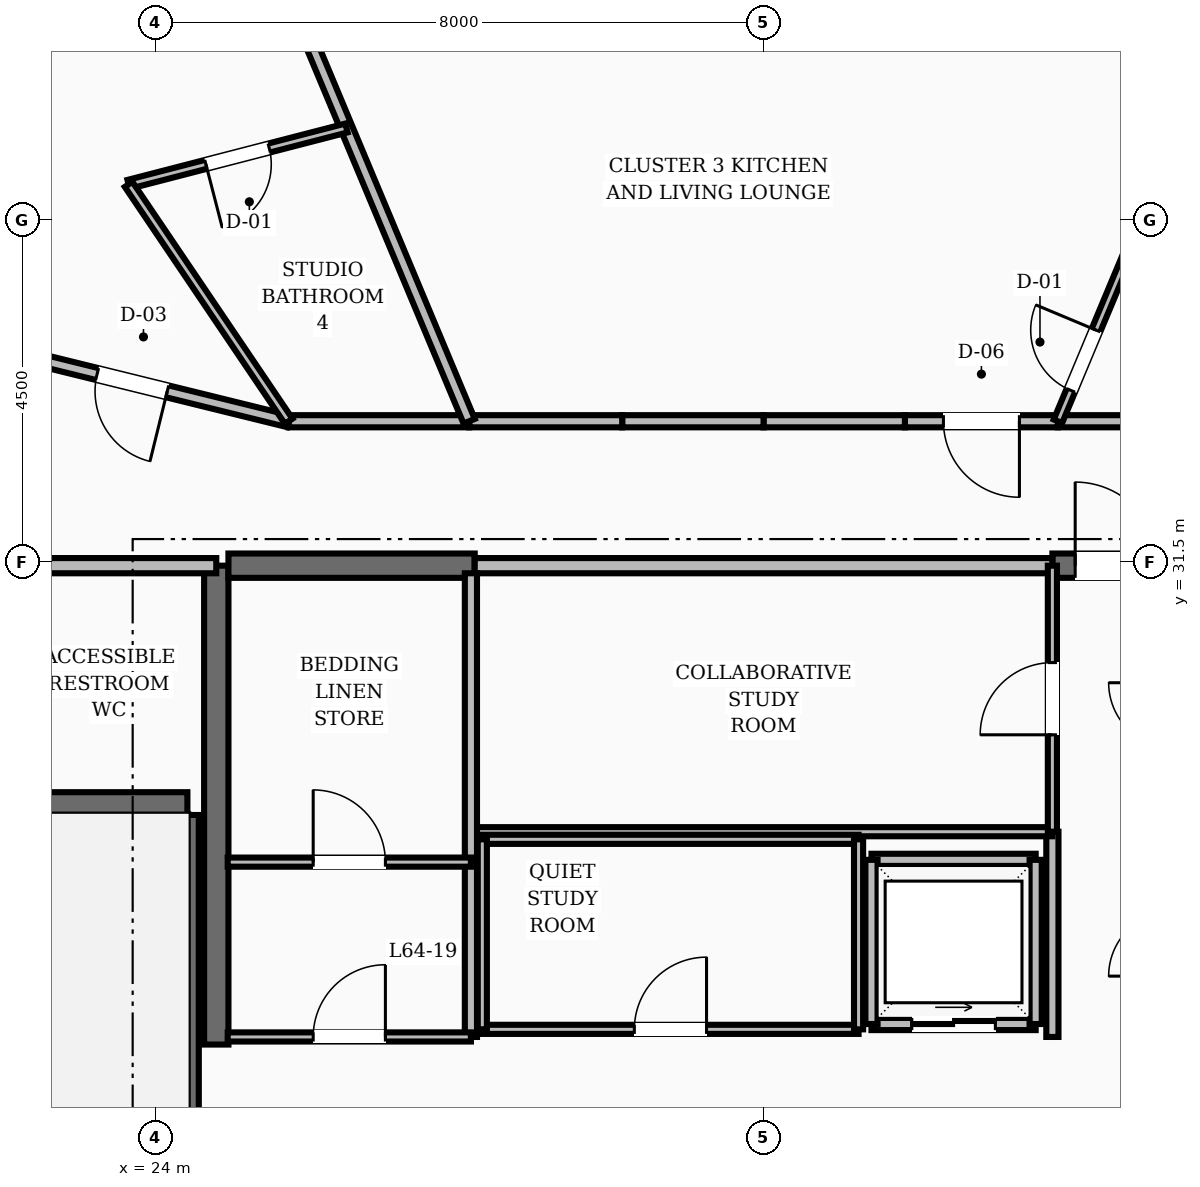
"""IFC4 building model, lengths in metres.
Left out: names, types, materials, properties, quantities, classifications, styles, units other than length and angle.
Written with IfcOpenShell. Run it as: python <this file> out.ifc"""

import sys

from ifc_helpers import new_model, si_unit, direction, frame, frame_2d, origin, place, context, subcontext, project, spatial, rectangle, extrude, element, fill, save


model = new_model("IFC4")
c1 = context("Model", 3, precision=1e-05, world=origin(), true_north=direction((0.0, 1.0)))
c2 = subcontext(c1, "Body", "Model", "MODEL_VIEW")
j1 = project(units=[si_unit("LENGTHUNIT", "METRE"), si_unit("PLANEANGLEUNIT", "RADIAN")], contexts=[c1])
p1 = place(None, origin())
s1 = spatial("IfcSite", under=j1, at=p1, CompositionType="ELEMENT")
p2 = place(p1, origin())
s2 = spatial("IfcBuilding", under=s1, at=p2, CompositionType="ELEMENT")
p3 = place(p2, frame((0.0, 0.0, 247.2)))
s3 = spatial("IfcBuildingStorey", under=s2, at=p3, CompositionType="ELEMENT", Elevation=247.2)
p4 = place(p3, frame((24.8, 25.15, 0.0), z_axis=(0.0, 0.0, 1.0), x_axis=(0.0, 1.0, 0.0)))
e1 = element("IfcWall", 1, at=p4, inside=s3, PredefinedType="SHEAR", context=c2, shape_type="SweptSolid", body=[
    extrude(rectangle(XDim=6.3, YDim=0.32, at=frame_2d((3.15, 0.0))), origin(), (0.0, 0.0, 1.0), 3.6),
])
p5 = place(p3, frame((24.96, 31.45, 0.0), z_axis=(0.0, 0.0, 1.0), x_axis=(1.0, 0.0, 0.0)))
e2 = element("IfcWall", 2, at=p5, inside=s3, PredefinedType="SHEAR", context=c2, shape_type="SweptSolid", body=[
    extrude(rectangle(XDim=3.24, YDim=0.32, at=frame_2d((1.62, 0.0))), origin(), (0.0, 0.0, 1.0), 3.6),
])
p6 = place(p3, frame((35.8, 31.45, 0.0), z_axis=(0.0, 0.0, 1.0), x_axis=(1.0, 0.0, 0.0)))
e3 = element("IfcWall", 3, at=p6, inside=s3, PredefinedType="SHEAR", context=c2, shape_type="SweptSolid", body=[
    extrude(rectangle(XDim=3.24, YDim=0.32, at=frame_2d((1.62, 0.0))), origin(), (0.0, 0.0, 1.0), 3.6),
])
p7 = place(p6, frame((0.3, 0.0, 0.0)))
e4 = element("IfcOpeningElement", 4, at=p7, cuts=e3, PredefinedType="OPENING", context=c2, shape_type="SweptSolid", body=[
    extrude(rectangle(XDim=1.1, YDim=2.1, at=frame_2d((0.55, 1.05))), frame((0.0, 0.17, 0.0), z_axis=(0.0, -1.0, 0.0), x_axis=(1.0, 0.0, 0.0)), (0.0, 0.0, 1.0), 0.34),
])
p8 = place(p3, frame((24.42, 19.43, 0.0), z_axis=(0.0, 0.0, 1.0), x_axis=(0.0, 1.0, 0.0)))
e5 = element("IfcWall", 5, at=p8, inside=s3, PredefinedType="SHEAR", context=c2, shape_type="SweptSolid", body=[
    extrude(rectangle(XDim=8.74, YDim=0.3, at=frame_2d((4.37, 0.0))), origin(), (0.0, 0.0, 1.0), 3.6),
])
p9 = place(p3, frame((20.82, 28.32, 0.0), z_axis=(0.0, 0.0, 1.0), x_axis=(1.0, 0.0, 0.0)))
e6 = element("IfcWall", 6, at=p9, inside=s3, PredefinedType="SHEAR", context=c2, shape_type="SweptSolid", body=[
    extrude(rectangle(XDim=3.6, YDim=0.3, at=frame_2d((1.8, 0.0))), origin(), (0.0, 0.0, 1.0), 3.6),
])
p10 = place(p3, frame((20.82, 31.45, 0.0), z_axis=(0.0, 0.0, 1.0), x_axis=(1.0, 0.0, 0.0)))
e7 = element("IfcWall", 7, at=p10, inside=s3, PredefinedType="SOLIDWALL", context=c2, shape_type="SweptSolid", body=[
    extrude(rectangle(XDim=3.98, YDim=0.2, at=frame_2d((1.99, 0.0))), origin(), (0.0, 0.0, 1.0), 2.87),
])
p11 = place(p3, frame((35.8, 25.25, 0.0), z_axis=(0.0, 0.0, 1.0), x_axis=(0.0, 1.0, 0.0)))
e8 = element("IfcWall", 8, at=p11, inside=s3, PredefinedType="SOLIDWALL", context=c2, shape_type="SweptSolid", body=[
    extrude(rectangle(XDim=2.7, YDim=0.16, at=frame_2d((1.35, 0.0))), origin(), (0.0, 0.0, 1.0), 2.87),
])
p12 = place(p3, frame((33.42, 25.42, 0.0), z_axis=(0.0, 0.0, 1.0), x_axis=(1.0, 0.0, 0.0)))
e9 = element("IfcWall", 9, at=p12, inside=s3, PredefinedType="SOLIDWALL", context=c2, shape_type="SweptSolid", body=[
    extrude(rectangle(XDim=2.16, YDim=0.16, at=frame_2d((1.08, 0.0))), origin(), (0.0, 0.0, 1.0), 2.87),
])
p13 = place(p12, frame((0.53, 0.0, 0.0)))
e10 = element("IfcOpeningElement", 10, at=p13, cuts=e9, PredefinedType="OPENING", context=c2, shape_type="SweptSolid", body=[
    extrude(rectangle(XDim=1.1, YDim=2.15, at=frame_2d((0.55, 1.075))), frame((0.0, 0.09, 0.0), z_axis=(0.0, -1.0, 0.0), x_axis=(1.0, 0.0, 0.0)), (0.0, 0.0, 1.0), 0.18),
])
for number, where, z_axis, x_axis in (
    (11, (33.42, 27.58, 0.0), (0.0, 0.0, 1.0), (1.0, 0.0, 0.0)),
    (12, (33.42, 25.42, 0.0), (0.0, 0.0, 1.0), (0.0, 1.0, 0.0)),
    (13, (35.58, 25.42, 0.0), (0.0, 0.0, 1.0), (0.0, 1.0, 0.0)),
):
    element("IfcWall", number, at=place(p3, frame(where, z_axis=z_axis, x_axis=x_axis)), inside=s3, PredefinedType="SOLIDWALL", context=c2, shape_type="SweptSolid", body=[
        extrude(rectangle(XDim=2.16, YDim=0.16, at=frame_2d((1.08, 0.0))), origin(), (0.0, 0.0, 1.0), 2.87),
    ])
p14 = place(p3, frame((28.2, 31.45, 0.0), z_axis=(0.0, 0.0, 1.0), x_axis=(1.0, 0.0, 0.0)))
e14 = element("IfcWall", 14, at=p14, inside=s3, PredefinedType="SOLIDWALL", context=c2, shape_type="SweptSolid", body=[
    extrude(rectangle(XDim=7.6, YDim=0.2, at=frame_2d((3.8, 0.0))), origin(), (0.0, 0.0, 1.0), 2.87),
])
p15 = place(p3, frame((28.2, 27.95, 0.0), z_axis=(0.0, 0.0, 1.0), x_axis=(1.0, 0.0, 0.0)))
e15 = element("IfcWall", 15, at=p15, inside=s3, PredefinedType="PARTITIONING", context=c2, shape_type="SweptSolid", body=[
    extrude(rectangle(XDim=7.6, YDim=0.12, at=frame_2d((3.8, 0.0))), origin(), (0.0, 0.0, 1.0), 2.87),
])
p16 = place(p3, frame((35.8, 27.95, 0.0), z_axis=(0.0, 0.0, 1.0), x_axis=(0.0, 1.0, 0.0)))
e16 = element("IfcWall", 16, at=p16, inside=s3, PredefinedType="PARTITIONING", context=c2, shape_type="SweptSolid", body=[
    extrude(rectangle(XDim=3.5, YDim=0.12, at=frame_2d((1.75, 0.0))), origin(), (0.0, 0.0, 1.0), 2.87),
])
p17 = place(p16, frame((1.275, 0.0, 0.0)))
e17 = element("IfcOpeningElement", 17, at=p17, cuts=e16, PredefinedType="OPENING", context=c2, shape_type="SweptSolid", body=[
    extrude(rectangle(XDim=0.95, YDim=2.1, at=frame_2d((0.475, 1.05))), frame((0.0, 0.07, 0.0), z_axis=(0.0, -1.0, 0.0), x_axis=(1.0, 0.0, 0.0)), (0.0, 0.0, 1.0), 0.14),
])
p18 = place(p3, frame((28.3, 25.35, 0.0), z_axis=(0.0, 0.0, 1.0), x_axis=(1.0, 0.0, 0.0)))
e18 = element("IfcWall", 18, at=p18, inside=s3, PredefinedType="PARTITIONING", context=c2, shape_type="SweptSolid", body=[
    extrude(rectangle(XDim=4.95, YDim=0.12, at=frame_2d((2.475, 0.0))), origin(), (0.0, 0.0, 1.0), 2.87),
])
p19 = place(p18, frame((2.0, 0.0, 0.0)))
e19 = element("IfcOpeningElement", 19, at=p19, cuts=e18, PredefinedType="OPENING", context=c2, shape_type="SweptSolid", body=[
    extrude(rectangle(XDim=0.95, YDim=2.1, at=frame_2d((0.475, 1.05))), frame((0.0, 0.07, 0.0), z_axis=(0.0, -1.0, 0.0), x_axis=(1.0, 0.0, 0.0)), (0.0, 0.0, 1.0), 0.14),
])
p20 = place(p3, frame((28.3, 27.85, 0.0), z_axis=(0.0, 0.0, 1.0), x_axis=(1.0, 0.0, 0.0)))
e20 = element("IfcWall", 20, at=p20, inside=s3, PredefinedType="PARTITIONING", context=c2, shape_type="SweptSolid", body=[
    extrude(rectangle(XDim=4.95, YDim=0.12, at=frame_2d((2.475, 0.0))), origin(), (0.0, 0.0, 1.0), 2.87),
])
for number, where, z_axis, x_axis in (
    (21, (28.3, 25.35, 0.0), (0.0, 0.0, 1.0), (0.0, 1.0, 0.0)),
    (22, (33.25, 25.35, 0.0), (0.0, 0.0, 1.0), (0.0, 1.0, 0.0)),
):
    element("IfcWall", number, at=place(p3, frame(where, z_axis=z_axis, x_axis=x_axis)), inside=s3, PredefinedType="PARTITIONING", context=c2, shape_type="SweptSolid", body=[
        extrude(rectangle(XDim=2.5, YDim=0.12, at=frame_2d((1.25, 0.0))), origin(), (0.0, 0.0, 1.0), 2.87),
    ])
p21 = place(p3, frame((28.15, 25.25, 0.0), z_axis=(0.0, 0.0, 1.0), x_axis=(0.0, 1.0, 0.0)))
e23 = element("IfcWall", 23, at=p21, inside=s3, PredefinedType="SOLIDWALL", context=c2, shape_type="SweptSolid", body=[
    extrude(rectangle(XDim=6.1, YDim=0.16, at=frame_2d((3.05, 0.0))), origin(), (0.0, 0.0, 1.0), 2.87),
])
p22 = place(p3, frame((24.95, 25.25, 0.0), z_axis=(0.0, 0.0, 1.0), x_axis=(1.0, 0.0, 0.0)))
e24 = element("IfcWall", 24, at=p22, inside=s3, PredefinedType="PARTITIONING", context=c2, shape_type="SweptSolid", body=[
    extrude(rectangle(XDim=3.2, YDim=0.12, at=frame_2d((1.6, 0.0))), origin(), (0.0, 0.0, 1.0), 2.87),
])
p23 = place(p22, frame((1.125, 0.0, 0.0)))
e25 = element("IfcOpeningElement", 25, at=p23, cuts=e24, PredefinedType="OPENING", context=c2, shape_type="SweptSolid", body=[
    extrude(rectangle(XDim=0.95, YDim=2.1, at=frame_2d((0.475, 1.05))), frame((0.0, 0.07, 0.0), z_axis=(0.0, -1.0, 0.0), x_axis=(1.0, 0.0, 0.0)), (0.0, 0.0, 1.0), 0.14),
])
p24 = place(p3, frame((24.95, 27.55, 0.0), z_axis=(0.0, 0.0, 1.0), x_axis=(1.0, 0.0, 0.0)))
e26 = element("IfcWall", 26, at=p24, inside=s3, PredefinedType="PARTITIONING", context=c2, shape_type="SweptSolid", body=[
    extrude(rectangle(XDim=3.2, YDim=0.12, at=frame_2d((1.6, 0.0))), origin(), (0.0, 0.0, 1.0), 2.87),
])
p25 = place(p24, frame((1.125, 0.0, 0.0)))
e27 = element("IfcOpeningElement", 27, at=p25, cuts=e26, PredefinedType="OPENING", context=c2, shape_type="SweptSolid", body=[
    extrude(rectangle(XDim=0.95, YDim=2.1, at=frame_2d((0.475, 1.05))), frame((0.0, 0.07, 0.0), z_axis=(0.0, -1.0, 0.0), x_axis=(1.0, 0.0, 0.0)), (0.0, 0.0, 1.0), 0.14),
])
p26 = place(p3, frame((38.248, 33.35, 0.0), z_axis=(0.0, 0.0, 1.0), x_axis=(-1.0, 0.0, 0.0)))
e28 = element("IfcWall", 28, at=p26, inside=s3, PredefinedType="SOLIDWALL", context=c2, shape_type="SweptSolid", body=[
    extrude(rectangle(XDim=2.375, YDim=0.16, at=frame_2d((1.188, 0.0))), origin(), (0.0, 0.0, 1.0), 2.87),
])
p27 = place(p3, frame((35.873, 33.35, 0.0), z_axis=(0.0, 0.0, 1.0), x_axis=(-1.0, 0.0, 0.0)))
e29 = element("IfcWall", 29, at=p27, inside=s3, PredefinedType="SOLIDWALL", context=c2, shape_type="SweptSolid", body=[
    extrude(rectangle(XDim=2.013, YDim=0.16, at=frame_2d((1.006, 0.0))), origin(), (0.0, 0.0, 1.0), 2.87),
])
p28 = place(p27, frame((0.507, 0.0, 0.0)))
e30 = element("IfcOpeningElement", 30, at=p28, cuts=e29, PredefinedType="OPENING", context=c2, shape_type="SweptSolid", body=[
    extrude(rectangle(XDim=1.0, YDim=2.1, at=frame_2d((0.5, 1.05))), frame((0.0, 0.09, 0.0), z_axis=(0.0, -1.0, 0.0), x_axis=(1.0, 0.0, 0.0)), (0.0, 0.0, 1.0), 0.18),
])
for number, where, z_axis, x_axis in (
    (31, (33.86, 33.35, 0.0), (0.0, 0.0, 1.0), (-1.0, 0.0, 0.0)),
    (32, (32.0, 33.35, 0.0), (0.0, 0.0, 1.0), (-1.0, 0.0, 0.0)),
):
    element("IfcWall", number, at=place(p3, frame(where, z_axis=z_axis, x_axis=x_axis)), inside=s3, PredefinedType="SOLIDWALL", context=c2, shape_type="SweptSolid", body=[
        extrude(rectangle(XDim=1.86, YDim=0.16, at=frame_2d((0.93, 0.0))), origin(), (0.0, 0.0, 1.0), 2.87),
    ])
p29 = place(p3, frame((30.14, 33.35, 0.0), z_axis=(0.0, 0.0, 1.0), x_axis=(-1.0, 0.0, 0.0)))
e33 = element("IfcWall", 33, at=p29, inside=s3, PredefinedType="SOLIDWALL", context=c2, shape_type="SweptSolid", body=[
    extrude(rectangle(XDim=2.013, YDim=0.16, at=frame_2d((1.006, 0.0))), origin(), (0.0, 0.0, 1.0), 2.87),
])
p30 = place(p3, frame((28.127, 33.35, 0.0), z_axis=(0.0, 0.0, 1.0), x_axis=(-1.0, 0.0, 0.0)))
e34 = element("IfcWall", 34, at=p30, inside=s3, PredefinedType="SOLIDWALL", context=c2, shape_type="SweptSolid", body=[
    extrude(rectangle(XDim=2.375, YDim=0.16, at=frame_2d((1.188, 0.0))), origin(), (0.0, 0.0, 1.0), 2.87),
])
p31 = place(p3, frame((25.752, 33.35, 0.0), z_axis=(0.0, 0.0, 1.0), x_axis=(-0.970939799552, 0.239323850978, 0.0)))
e35 = element("IfcWall", 35, at=p31, inside=s3, PredefinedType="SOLIDWALL", context=c2, shape_type="SweptSolid", body=[
    extrude(rectangle(XDim=4.241, YDim=0.16, at=frame_2d((2.12, 0.0))), origin(), (0.0, 0.0, 1.0), 2.87),
])
p32 = place(p31, frame((1.646, 0.0, 0.0)))
e36 = element("IfcOpeningElement", 36, at=p32, cuts=e35, PredefinedType="OPENING", context=c2, shape_type="SweptSolid", body=[
    extrude(rectangle(XDim=0.95, YDim=2.1, at=frame_2d((0.475, 1.05))), frame((0.0, 0.09, 0.0), z_axis=(0.0, -1.0, 0.0), x_axis=(1.0, 0.0, 0.0)), (0.0, 0.0, 1.0), 0.18),
])
p33 = place(p3, frame((35.873, 33.35, 0.0), z_axis=(0.0, 0.0, 1.0), x_axis=(0.386006387389, 0.922496107794, 0.0)))
e37 = element("IfcWall", 37, at=p33, inside=s3, PredefinedType="PARTITIONING", context=c2, shape_type="SweptSolid", body=[
    extrude(rectangle(XDim=3.962, YDim=0.12, at=frame_2d((1.981, 0.0))), origin(), (0.0, 0.0, 1.0), 2.87),
])
p34 = place(p33, frame((0.44, 0.0, 0.0)))
e38 = element("IfcOpeningElement", 38, at=p34, cuts=e37, PredefinedType="OPENING", context=c2, shape_type="SweptSolid", body=[
    extrude(rectangle(XDim=0.86, YDim=2.1, at=frame_2d((0.43, 1.05))), frame((0.0, 0.07, 0.0), z_axis=(0.0, -1.0, 0.0), x_axis=(1.0, 0.0, 0.0)), (0.0, 0.0, 1.0), 0.14),
])
p35 = place(p3, frame((28.127, 33.35, 0.0), z_axis=(0.0, 0.0, 1.0), x_axis=(-0.385967865978, 0.922512225628, 0.0)))
e39 = element("IfcWall", 39, at=p35, inside=s3, PredefinedType="SOLIDWALL", context=c2, shape_type="SweptSolid", body=[
    extrude(rectangle(XDim=10.956, YDim=0.16, at=frame_2d((5.478, 0.0))), origin(), (0.0, 0.0, 1.0), 2.87),
])
p36 = place(p3, frame((26.513, 37.208, 0.0), z_axis=(0.0, 0.0, 1.0), x_axis=(-0.968151047418, -0.250366829639, 0.0)))
e40 = element("IfcWall", 40, at=p36, inside=s3, PredefinedType="PARTITIONING", context=c2, shape_type="SweptSolid", body=[
    extrude(rectangle(XDim=2.96, YDim=0.12, at=frame_2d((1.48, 0.0))), origin(), (0.0, 0.0, 1.0), 2.87),
])
p37 = place(p36, frame((1.05, 0.0, 0.0)))
e41 = element("IfcOpeningElement", 41, at=p37, cuts=e40, PredefinedType="OPENING", context=c2, shape_type="SweptSolid", body=[
    extrude(rectangle(XDim=0.86, YDim=2.1, at=frame_2d((0.43, 1.05))), frame((0.0, 0.07, 0.0), z_axis=(0.0, -1.0, 0.0), x_axis=(1.0, 0.0, 0.0)), (0.0, 0.0, 1.0), 0.14),
])
p38 = place(p3, frame((25.752, 33.35, 0.0), z_axis=(0.0, 0.0, 1.0), x_axis=(-0.559827300853, 0.828609312776, 0.0)))
e42 = element("IfcWall", 42, at=p38, inside=s3, PredefinedType="PARTITIONING", context=c2, shape_type="SweptSolid", body=[
    extrude(rectangle(XDim=3.761, YDim=0.12, at=frame_2d((1.881, 0.0))), origin(), (0.0, 0.0, 1.0), 2.87),
])
p39 = place(p7, origin())
e43 = element("IfcDoor", 43, at=p39, inside=s3, OperationType="SINGLE_SWING_LEFT", PredefinedType="DOOR", context=c2, shape_type="SweptSolid", body=[
    extrude(rectangle(XDim=1.1, YDim=2.1, at=frame_2d((0.55, 1.05))), frame((0.0, 0.025, 0.0), z_axis=(0.0, -1.0, 0.0), x_axis=(1.0, 0.0, 0.0)), (0.0, 0.0, 1.0), 0.05),
])
fill(e4, e43)
p40 = place(p13, origin())
e44 = element("IfcDoor", 44, at=p40, inside=s3, OperationType="SLIDING_TO_RIGHT", PredefinedType="DOOR", context=c2, shape_type="SweptSolid", body=[
    extrude(rectangle(XDim=1.1, YDim=2.15, at=frame_2d((0.55, 1.075))), frame((0.0, 0.025, 0.0), z_axis=(0.0, -1.0, 0.0), x_axis=(1.0, 0.0, 0.0)), (0.0, 0.0, 1.0), 0.05),
])
fill(e10, e44)
p41 = place(p17, origin())
e45 = element("IfcDoor", 45, at=p41, inside=s3, OperationType="SINGLE_SWING_LEFT", PredefinedType="DOOR", context=c2, shape_type="SweptSolid", body=[
    extrude(rectangle(XDim=0.95, YDim=2.1, at=frame_2d((0.475, 1.05))), frame((0.0, 0.025, 0.0), z_axis=(0.0, -1.0, 0.0), x_axis=(1.0, 0.0, 0.0)), (0.0, 0.0, 1.0), 0.05),
])
fill(e17, e45)
p42 = place(p19, origin())
e46 = element("IfcDoor", 46, at=p42, inside=s3, OperationType="SINGLE_SWING_RIGHT", PredefinedType="DOOR", context=c2, shape_type="SweptSolid", body=[
    extrude(rectangle(XDim=0.95, YDim=2.1, at=frame_2d((0.475, 1.05))), frame((0.0, 0.025, 0.0), z_axis=(0.0, -1.0, 0.0), x_axis=(1.0, 0.0, 0.0)), (0.0, 0.0, 1.0), 0.05),
])
fill(e19, e46)
p43 = place(p23, origin())
e47 = element("IfcDoor", 47, at=p43, inside=s3, OperationType="SINGLE_SWING_RIGHT", PredefinedType="DOOR", context=c2, shape_type="SweptSolid", body=[
    extrude(rectangle(XDim=0.95, YDim=2.1, at=frame_2d((0.475, 1.05))), frame((0.0, 0.025, 0.0), z_axis=(0.0, -1.0, 0.0), x_axis=(1.0, 0.0, 0.0)), (0.0, 0.0, 1.0), 0.05),
])
fill(e25, e47)
p44 = place(p25, origin())
e48 = element("IfcDoor", 48, at=p44, inside=s3, OperationType="SINGLE_SWING_LEFT", PredefinedType="DOOR", context=c2, shape_type="SweptSolid", body=[
    extrude(rectangle(XDim=0.95, YDim=2.1, at=frame_2d((0.475, 1.05))), frame((0.0, 0.025, 0.0), z_axis=(0.0, -1.0, 0.0), x_axis=(1.0, 0.0, 0.0)), (0.0, 0.0, 1.0), 0.05),
])
fill(e27, e48)
p45 = place(p34, origin())
e49 = element("IfcDoor", 49, at=p45, inside=s3, OperationType="SINGLE_SWING_RIGHT", PredefinedType="DOOR", context=c2, shape_type="SweptSolid", body=[
    extrude(rectangle(XDim=0.86, YDim=2.1, at=frame_2d((0.43, 1.05))), frame((0.0, 0.025, 0.0), z_axis=(0.0, -1.0, 0.0), x_axis=(1.0, 0.0, 0.0)), (0.0, 0.0, 1.0), 0.05),
])
fill(e38, e49)
p46 = place(p28, origin())
e50 = element("IfcDoor", 50, at=p46, inside=s3, OperationType="SINGLE_SWING_LEFT", PredefinedType="DOOR", context=c2, shape_type="SweptSolid", body=[
    extrude(rectangle(XDim=1.0, YDim=2.1, at=frame_2d((0.5, 1.05))), frame((0.0, 0.025, 0.0), z_axis=(0.0, -1.0, 0.0), x_axis=(1.0, 0.0, 0.0)), (0.0, 0.0, 1.0), 0.05),
])
fill(e30, e50)
p47 = place(p37, origin())
e51 = element("IfcDoor", 51, at=p47, inside=s3, OperationType="SINGLE_SWING_RIGHT", PredefinedType="DOOR", context=c2, shape_type="SweptSolid", body=[
    extrude(rectangle(XDim=0.86, YDim=2.1, at=frame_2d((0.43, 1.05))), frame((0.0, 0.025, 0.0), z_axis=(0.0, -1.0, 0.0), x_axis=(1.0, 0.0, 0.0)), (0.0, 0.0, 1.0), 0.05),
])
fill(e41, e51)
p48 = place(p32, origin())
e52 = element("IfcDoor", 52, at=p48, inside=s3, OperationType="SINGLE_SWING_LEFT", PredefinedType="DOOR", context=c2, shape_type="SweptSolid", body=[
    extrude(rectangle(XDim=0.95, YDim=2.1, at=frame_2d((0.475, 1.05))), frame((0.0, 0.025, 0.0), z_axis=(0.0, -1.0, 0.0), x_axis=(1.0, 0.0, 0.0)), (0.0, 0.0, 1.0), 0.05),
])
fill(e36, e52)
save(model, sys.argv[1])
